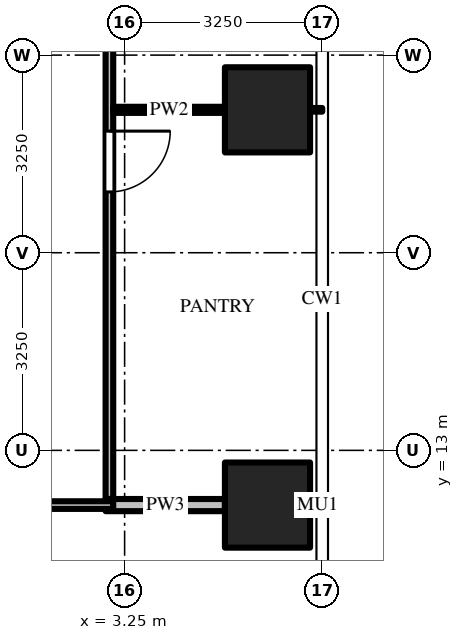
"""IFC4 building model, lengths in metres.
Left out: names, types, materials, properties, quantities, classifications, styles, units other than length and angle.
Written with IfcOpenShell. Run it as: python <this file> out.ifc"""

import sys

from ifc_helpers import new_model, si_unit, direction, frame, frame_2d, origin, origin_2d, place, context, subcontext, project, spatial, rectangle, extrude, source, transform, mapped, element, fill, save


model = new_model("IFC4")
c1 = context("Model", 3, precision=1e-05, world=origin(), true_north=direction((0.0, 1.0)))
c2 = subcontext(c1, "Body", "Model", "MODEL_VIEW")
j1 = project(units=[si_unit("LENGTHUNIT", "METRE"), si_unit("PLANEANGLEUNIT", "RADIAN")], contexts=[c1])
p1 = place(None, origin())
s1 = spatial("IfcSite", under=j1, at=p1, CompositionType="ELEMENT")
p2 = place(p1, origin())
s2 = spatial("IfcBuilding", under=s1, at=p2, CompositionType="ELEMENT")
p3 = place(p2, frame((0.0, 0.0, 74.5)))
s3 = spatial("IfcBuildingStorey", under=s2, at=p3, CompositionType="ELEMENT", Elevation=74.5)
m1 = source(origin(), c2, "Body", "SweptSolid", [
    extrude(rectangle(XDim=1.4, YDim=1.4, at=origin_2d()), origin(), (0.0, 0.0, 1.0), 4.5),
])
for number, where, z_axis, x_axis in (
    (1, (5.6, 12.1, 0.0), (0.0, 0.0, 1.0), (1.0, 0.0, 0.0)),
    (2, (5.6, 18.6, 0.0), (0.0, 0.0, 1.0), (1.0, 0.0, 0.0)),
):
    element("IfcColumn", number, at=place(p3, frame(where, z_axis=z_axis, x_axis=x_axis)), inside=s3, PredefinedType="COLUMN", context=c2, shape_type="MappedRepresentation", body=[
        mapped(m1, transform((0.0, 0.0, 0.0))),
    ])
m2 = source(origin(), c2, "Body", "SweptSolid", [
    extrude(rectangle(XDim=8.738, YDim=0.125, at=frame_2d((4.369, 0.0))), origin(), (0.0, 0.0, 1.0), 3.468),
])
p4 = place(p3, frame((3.0, 20.938, 0.0), z_axis=(0.0, 0.0, 1.0), x_axis=(0.0, -1.0, 0.0)))
e3 = element("IfcWall", 3, at=p4, inside=s3, PredefinedType="PARTITIONING", context=c2, shape_type="MappedRepresentation", body=[
    mapped(m2, transform((0.0, 0.0, 0.0))),
])
m3 = source(origin(), c2, "Body", "SweptSolid", [
    extrude(rectangle(XDim=1.0, YDim=2.1, at=frame_2d((0.5, 1.05))), frame((0.0, 0.073, 0.0), z_axis=(0.0, -1.0, 0.0), x_axis=(1.0, 0.0, 0.0)), (0.0, 0.0, 1.0), 0.145),
])
p5 = place(p4, frame((2.688, 0.0, 0.0)))
e4 = element("IfcOpeningElement", 4, at=p5, cuts=e3, PredefinedType="OPENING", context=c2, shape_type="MappedRepresentation", body=[
    mapped(m3, transform((0.0, 0.0, 0.0))),
])
m4 = source(origin(), c2, "Body", "SweptSolid", [
    extrude(rectangle(XDim=1.962, YDim=0.2, at=frame_2d((0.981, 0.0))), origin(), (0.0, 0.0, 1.0), 3.468),
])
p6 = place(p3, frame((2.938, 12.1, 0.0), z_axis=(0.0, 0.0, 1.0), x_axis=(1.0, 0.0, 0.0)))
e5 = element("IfcWall", 5, at=p6, inside=s3, PredefinedType="PARTITIONING", context=c2, shape_type="MappedRepresentation", body=[
    mapped(m4, transform((0.0, 0.0, 0.0))),
])
m5 = source(origin(), c2, "Body", "SweptSolid", [
    extrude(rectangle(XDim=1.925, YDim=0.125, at=frame_2d((0.962, 0.0))), origin(), (0.0, 0.0, 1.0), 3.468),
])
p7 = place(p3, frame((3.062, 12.1, 0.0), z_axis=(0.0, 0.0, 1.0), x_axis=(-1.0, 0.0, 0.0)))
e6 = element("IfcWall", 6, at=p7, inside=s3, PredefinedType="PARTITIONING", context=c2, shape_type="MappedRepresentation", body=[
    mapped(m5, transform((0.0, 0.0, 0.0))),
])
m6 = source(origin(), c2, "Body", "SweptSolid", [
    extrude(rectangle(XDim=1.837, YDim=0.1, at=frame_2d((0.919, 0.0))), origin(), (0.0, 0.0, 1.0), 3.697),
])
p8 = place(p3, frame((3.062, 18.6, 0.0), z_axis=(0.0, 0.0, 1.0), x_axis=(1.0, 0.0, 0.0)))
e7 = element("IfcWall", 7, at=p8, inside=s3, PredefinedType="PARTITIONING", context=c2, shape_type="MappedRepresentation", body=[
    mapped(m6, transform((0.0, 0.0, 0.0))),
])
m7 = source(origin(), c2, "Body", "SweptSolid", [
    extrude(rectangle(XDim=1.0, YDim=2.1, at=frame_2d((0.5, 1.05))), frame((0.0, 0.025, 0.0), z_axis=(0.0, -1.0, 0.0), x_axis=(1.0, 0.0, 0.0)), (0.0, 0.0, 1.0), 0.05),
])
p9 = place(p5, origin())
e8 = element("IfcDoor", 8, at=p9, inside=s3, OperationType="SINGLE_SWING_LEFT", PredefinedType="DOOR", context=c2, shape_type="MappedRepresentation", body=[
    mapped(m7, transform((0.0, 0.0, 0.0))),
])
fill(e4, e8)
save(model, sys.argv[1])
